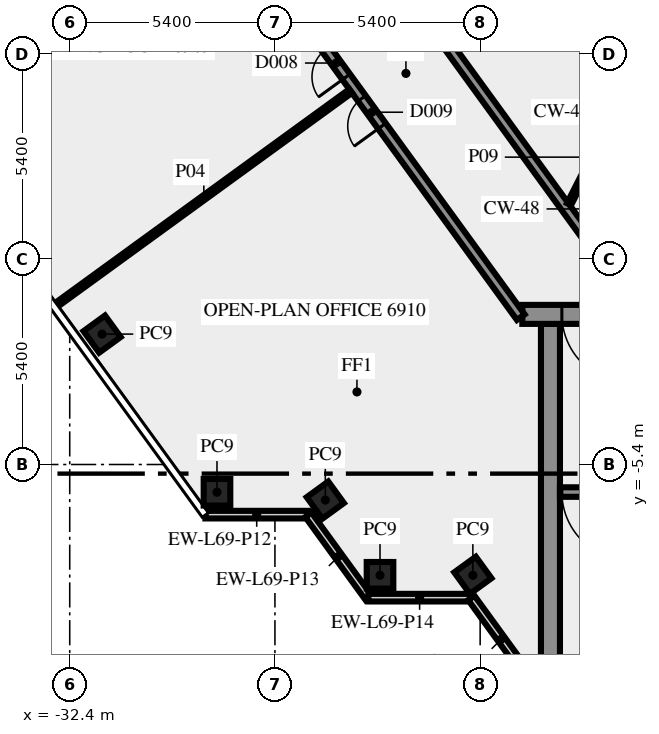
"""IFC4 building model, lengths in metres.
Left out: names, types, materials, properties, quantities, classifications, styles, units other than length and angle.
Written with IfcOpenShell. Run it as: python <this file> out.ifc"""

import sys

from ifc_helpers import new_model, si_unit, direction, frame, frame_2d, origin, origin_2d, place, context, subcontext, project, spatial, rectangle, extrude, element, fill, save


model = new_model("IFC4")
c1 = context("Model", 3, precision=1e-05, world=origin(), true_north=direction((0.0, 1.0)))
c2 = subcontext(c1, "Body", "Model", "MODEL_VIEW")
j1 = project(units=[si_unit("LENGTHUNIT", "METRE"), si_unit("PLANEANGLEUNIT", "RADIAN")], contexts=[c1])
p1 = place(None, origin())
s1 = spatial("IfcSite", under=j1, at=p1, CompositionType="ELEMENT")
p2 = place(p1, origin())
s2 = spatial("IfcBuilding", under=s1, at=p2, CompositionType="ELEMENT")
p3 = place(p2, frame((0.0, 0.0, 297.0)))
s3 = spatial("IfcBuildingStorey", under=s2, at=p3, CompositionType="ELEMENT", Elevation=297.0)
for number, where, z_axis, x_axis in (
    (1, (-31.548, -1.969, 0.0), (0.0, 0.0, 1.0), (0.588, -0.809, 0.0)),
    (2, (-28.525, -6.13, 0.0), (0.0, 0.0, 1.0), (1.0, 0.0, 0.0)),
    (3, (-25.674, -6.337, 0.0), (0.0, 0.0, 1.0), (0.588, -0.809, 0.0)),
    (4, (-24.235, -8.315, 0.0), (0.0, 0.0, 1.0), (1.0, 0.0, 0.0)),
    (5, (-21.792, -8.315, 0.0), (0.0, 0.0, 1.0), (0.588, -0.809, 0.0)),
):
    element("IfcColumn", number, at=place(p3, frame(where, z_axis=z_axis, x_axis=x_axis)), inside=s3, PredefinedType="COLUMN", context=c2, shape_type="SweptSolid", body=[
        extrude(rectangle(XDim=0.7, YDim=0.7, at=origin_2d()), origin(), (0.0, 0.0, 1.0), 3.4),
    ])
p4 = place(p3, frame((-28.83, -6.719, 0.0), z_axis=(0.0, 0.0, 1.0), x_axis=(1.0, 0.0, 0.0)))
e6 = element("IfcWall", 6, at=p4, inside=s3, PredefinedType="SOLIDWALL", context=c2, shape_type="SweptSolid", body=[
    extrude(rectangle(XDim=2.7, YDim=0.2, at=frame_2d((1.35, 0.0))), origin(), (0.0, 0.0, 1.0), 3.4),
])
p5 = place(p3, frame((-26.12, -6.724, 0.0), z_axis=(0.0, 0.0, 1.0), x_axis=(0.587720002413, -0.809064397168, 0.0)))
e7 = element("IfcWall", 7, at=p5, inside=s3, PredefinedType="SOLIDWALL", context=c2, shape_type="SweptSolid", body=[
    extrude(rectangle(XDim=2.7, YDim=0.2, at=frame_2d((1.35, 0.0))), origin(), (0.0, 0.0, 1.0), 3.4),
])
p6 = place(p3, frame((-24.543, -8.904, 0.0), z_axis=(0.0, 0.0, 1.0), x_axis=(1.0, 0.0, 0.0)))
e8 = element("IfcWall", 8, at=p6, inside=s3, PredefinedType="SOLIDWALL", context=c2, shape_type="SweptSolid", body=[
    extrude(rectangle(XDim=2.7, YDim=0.2, at=frame_2d((1.35, 0.0))), origin(), (0.0, 0.0, 1.0), 3.4),
])
p7 = place(p3, frame((-21.833, -8.909, 0.0), z_axis=(0.0, 0.0, 1.0), x_axis=(0.587766567315, -0.809030569476, 0.0)))
e9 = element("IfcWall", 9, at=p7, inside=s3, PredefinedType="SOLIDWALL", context=c2, shape_type="SweptSolid", body=[
    extrude(rectangle(XDim=2.688, YDim=0.2, at=frame_2d((1.344, 0.0))), origin(), (0.0, 0.0, 1.0), 3.4),
])
p8 = place(p3, frame((-19.75, -10.5, 0.0), z_axis=(0.0, 0.0, 1.0), x_axis=(0.0, 1.0, 0.0)))
e10 = element("IfcWall", 10, at=p8, inside=s3, PredefinedType="SHEAR", context=c2, shape_type="SweptSolid", body=[
    extrude(rectangle(XDim=8.8, YDim=0.5, at=frame_2d((4.4, 0.0))), origin(), (0.0, 0.0, 1.0), 3.4),
])
p9 = place(p3, frame((-11.45, -6.125, 0.0), z_axis=(0.0, 0.0, 1.0), x_axis=(-1.0, 0.0, 0.0)))
e11 = element("IfcWall", 11, at=p9, inside=s3, PredefinedType="SHEAR", context=c2, shape_type="SweptSolid", body=[
    extrude(rectangle(XDim=8.05, YDim=0.25, at=frame_2d((4.025, 0.0))), origin(), (0.0, 0.0, 1.0), 3.4),
])
p10 = place(p9, frame((6.2, 0.0, 0.0)))
e12 = element("IfcOpeningElement", 12, at=p10, cuts=e11, PredefinedType="OPENING", context=c2, shape_type="SweptSolid", body=[
    extrude(rectangle(XDim=1.8, YDim=2.1, at=frame_2d((0.9, 1.05))), frame((0.0, 0.135, 0.0), z_axis=(0.0, -1.0, 0.0), x_axis=(1.0, 0.0, 0.0)), (0.0, 0.0, 1.0), 0.27),
])
p11 = place(p3, frame((20.49, -1.45, 0.0), z_axis=(0.0, 0.0, 1.0), x_axis=(-1.0, 0.0, 0.0)))
e13 = element("IfcWall", 13, at=p11, inside=s3, PredefinedType="SHEAR", context=c2, shape_type="SweptSolid", body=[
    extrude(rectangle(XDim=40.98, YDim=0.5, at=frame_2d((20.49, 0.0))), origin(), (0.0, 0.0, 1.0), 3.4),
])
p12 = place(p11, frame((38.14, 0.0, 0.0)))
e14 = element("IfcOpeningElement", 14, at=p12, cuts=e13, PredefinedType="OPENING", context=c2, shape_type="SweptSolid", body=[
    extrude(rectangle(XDim=1.8, YDim=2.1, at=frame_2d((0.9, 1.05))), frame((0.0, 0.26, 0.0), z_axis=(0.0, -1.0, 0.0), x_axis=(1.0, 0.0, 0.0)), (0.0, 0.0, 1.0), 0.52),
])
p13 = place(p11, frame((36.728, 0.0, 0.0)))
e15 = element("IfcOpeningElement", 15, at=p13, cuts=e13, PredefinedType="OPENING", context=c2, shape_type="SweptSolid", body=[
    extrude(rectangle(XDim=0.8, YDim=2.1, at=frame_2d((0.4, 1.05))), frame((0.0, 0.26, 0.0), z_axis=(0.0, -1.0, 0.0), x_axis=(1.0, 0.0, 0.0)), (0.0, 0.0, 1.0), 0.52),
])
p14 = place(p11, frame((35.153, 0.0, 0.0)))
e16 = element("IfcOpeningElement", 16, at=p14, cuts=e13, PredefinedType="OPENING", context=c2, shape_type="SweptSolid", body=[
    extrude(rectangle(XDim=0.8, YDim=2.1, at=frame_2d((0.4, 1.05))), frame((0.0, 0.26, 0.0), z_axis=(0.0, -1.0, 0.0), x_axis=(1.0, 0.0, 0.0)), (0.0, 0.0, 1.0), 0.52),
])
p15 = place(p11, frame((32.94, 0.0, 0.0)))
e17 = element("IfcOpeningElement", 17, at=p15, cuts=e13, PredefinedType="OPENING", context=c2, shape_type="SweptSolid", body=[
    extrude(rectangle(XDim=0.9, YDim=2.1, at=frame_2d((0.45, 1.05))), frame((0.0, 0.26, 0.0), z_axis=(0.0, -1.0, 0.0), x_axis=(1.0, 0.0, 0.0)), (0.0, 0.0, 1.0), 0.52),
])
p16 = place(p11, frame((31.015, 0.0, 0.0)))
e18 = element("IfcOpeningElement", 18, at=p16, cuts=e13, PredefinedType="OPENING", context=c2, shape_type="SweptSolid", body=[
    extrude(rectangle(XDim=0.8, YDim=2.1, at=frame_2d((0.4, 1.05))), frame((0.0, 0.26, 0.0), z_axis=(0.0, -1.0, 0.0), x_axis=(1.0, 0.0, 0.0)), (0.0, 0.0, 1.0), 0.52),
])
p17 = place(p11, frame((24.765, 0.0, 0.0)))
e19 = element("IfcOpeningElement", 19, at=p17, cuts=e13, PredefinedType="OPENING", context=c2, shape_type="SweptSolid", body=[
    extrude(rectangle(XDim=0.8, YDim=2.1, at=frame_2d((0.4, 1.05))), frame((0.0, 0.26, 0.0), z_axis=(0.0, -1.0, 0.0), x_axis=(1.0, 0.0, 0.0)), (0.0, 0.0, 1.0), 0.52),
])
p18 = place(p11, frame((19.59, 0.0, 0.0)))
e20 = element("IfcOpeningElement", 20, at=p18, cuts=e13, PredefinedType="OPENING", context=c2, shape_type="SweptSolid", body=[
    extrude(rectangle(XDim=2.0, YDim=2.1, at=frame_2d((1.0, 1.05))), frame((0.0, 0.26, 0.0), z_axis=(0.0, -1.0, 0.0), x_axis=(1.0, 0.0, 0.0)), (0.0, 0.0, 1.0), 0.52),
])
p19 = place(p11, frame((14.202, 0.0, 0.0)))
e21 = element("IfcOpeningElement", 21, at=p19, cuts=e13, PredefinedType="OPENING", context=c2, shape_type="SweptSolid", body=[
    extrude(rectangle(XDim=0.9, YDim=2.1, at=frame_2d((0.45, 1.05))), frame((0.0, 0.26, 0.0), z_axis=(0.0, -1.0, 0.0), x_axis=(1.0, 0.0, 0.0)), (0.0, 0.0, 1.0), 0.52),
])
p20 = place(p11, frame((10.478, 0.0, 0.0)))
e22 = element("IfcOpeningElement", 22, at=p20, cuts=e13, PredefinedType="OPENING", context=c2, shape_type="SweptSolid", body=[
    extrude(rectangle(XDim=0.9, YDim=2.1, at=frame_2d((0.45, 1.05))), frame((0.0, 0.26, 0.0), z_axis=(0.0, -1.0, 0.0), x_axis=(1.0, 0.0, 0.0)), (0.0, 0.0, 1.0), 0.52),
])
p21 = place(p11, frame((7.14, 0.0, 0.0)))
e23 = element("IfcOpeningElement", 23, at=p21, cuts=e13, PredefinedType="OPENING", context=c2, shape_type="SweptSolid", body=[
    extrude(rectangle(XDim=0.9, YDim=2.1, at=frame_2d((0.45, 1.05))), frame((0.0, 0.26, 0.0), z_axis=(0.0, -1.0, 0.0), x_axis=(1.0, 0.0, 0.0)), (0.0, 0.0, 1.0), 0.52),
])
p22 = place(p11, frame((4.19, 0.0, 0.0)))
e24 = element("IfcOpeningElement", 24, at=p22, cuts=e13, PredefinedType="OPENING", context=c2, shape_type="SweptSolid", body=[
    extrude(rectangle(XDim=0.9, YDim=2.1, at=frame_2d((0.45, 1.05))), frame((0.0, 0.26, 0.0), z_axis=(0.0, -1.0, 0.0), x_axis=(1.0, 0.0, 0.0)), (0.0, 0.0, 1.0), 0.52),
])
p23 = place(p11, frame((1.04, 0.0, 0.0)))
e25 = element("IfcOpeningElement", 25, at=p23, cuts=e13, PredefinedType="OPENING", context=c2, shape_type="SweptSolid", body=[
    extrude(rectangle(XDim=1.8, YDim=2.1, at=frame_2d((0.9, 1.05))), frame((0.0, 0.26, 0.0), z_axis=(0.0, -1.0, 0.0), x_axis=(1.0, 0.0, 0.0)), (0.0, 0.0, 1.0), 0.52),
])
p24 = place(p3, frame((-20.531, -1.523, 0.0), z_axis=(0.0, 0.0, 1.0), x_axis=(-0.587785867777, 0.809016547199, 0.0)))
e26 = element("IfcWall", 26, at=p24, inside=s3, PredefinedType="SOLIDWALL", context=c2, shape_type="SweptSolid", body=[
    extrude(rectangle(XDim=16.67, YDim=0.25, at=frame_2d((8.335, 0.0))), origin(), (0.0, 0.0, 1.0), 3.4),
])
p25 = place(p24, frame((6.216, 0.0, 0.0)))
e27 = element("IfcOpeningElement", 27, at=p25, cuts=e26, PredefinedType="OPENING", context=c2, shape_type="SweptSolid", body=[
    extrude(rectangle(XDim=0.9, YDim=2.1, at=frame_2d((0.45, 1.05))), frame((0.0, 0.135, 0.0), z_axis=(0.0, -1.0, 0.0), x_axis=(1.0, 0.0, 0.0)), (0.0, 0.0, 1.0), 0.27),
])
p26 = place(p24, frame((7.816, 0.0, 0.0)))
e28 = element("IfcOpeningElement", 28, at=p26, cuts=e26, PredefinedType="OPENING", context=c2, shape_type="SweptSolid", body=[
    extrude(rectangle(XDim=0.9, YDim=2.1, at=frame_2d((0.45, 1.05))), frame((0.0, 0.135, 0.0), z_axis=(0.0, -1.0, 0.0), x_axis=(1.0, 0.0, 0.0)), (0.0, 0.0, 1.0), 0.27),
])
p27 = place(p3, frame((-28.039, 13.319, 0.0), z_axis=(0.0, 0.0, 1.0), x_axis=(0.587791911753, -0.809012155952, 0.0)))
e29 = element("IfcWall", 29, at=p27, inside=s3, PredefinedType="SOLIDWALL", context=c2, shape_type="SweptSolid", body=[
    extrude(rectangle(XDim=17.853, YDim=0.25, at=frame_2d((8.927, 0.0))), origin(), (0.0, 0.0, 1.0), 3.4),
])
p28 = place(p27, frame((0.225, 0.0, 0.0)))
e30 = element("IfcOpeningElement", 30, at=p28, cuts=e29, PredefinedType="OPENING", context=c2, shape_type="SweptSolid", body=[
    extrude(rectangle(XDim=0.9, YDim=2.1, at=frame_2d((0.45, 1.05))), frame((0.0, 0.135, 0.0), z_axis=(0.0, -1.0, 0.0), x_axis=(1.0, 0.0, 0.0)), (0.0, 0.0, 1.0), 0.27),
])
p29 = place(p3, frame((-25.008, 4.427, 0.0), z_axis=(0.0, 0.0, 1.0), x_axis=(-0.808994684961, -0.587815957341, 0.0)))
e31 = element("IfcWall", 31, at=p29, inside=s3, PredefinedType="PARTITIONING", context=c2, shape_type="SweptSolid", body=[
    extrude(rectangle(XDim=9.55, YDim=0.12, at=frame_2d((4.775, 0.0))), origin(), (0.0, 0.0, 1.0), 2.7),
])
p30 = place(p3, frame((-19.261, 1.45, 0.0), z_axis=(0.0, 0.0, 1.0), x_axis=(0.453950796792, 0.891026752736, 0.0)))
e32 = element("IfcWall", 32, at=p30, inside=s3, PredefinedType="PARTITIONING", context=c2, shape_type="SweptSolid", body=[
    extrude(rectangle(XDim=2.778, YDim=0.12, at=frame_2d((1.389, 0.0))), origin(), (0.0, 0.0, 1.0), 3.4),
])
p31 = place(p10, origin())
e33 = element("IfcDoor", 33, at=p31, inside=s3, OperationType="DOUBLE_DOOR_SINGLE_SWING", PredefinedType="DOOR", context=c2, shape_type="SweptSolid", body=[
    extrude(rectangle(XDim=1.8, YDim=2.1, at=frame_2d((0.9, 1.05))), frame((0.0, 0.025, 0.0), z_axis=(0.0, -1.0, 0.0), x_axis=(1.0, 0.0, 0.0)), (0.0, 0.0, 1.0), 0.05),
])
fill(e12, e33)
p32 = place(p12, origin())
e34 = element("IfcDoor", 34, at=p32, inside=s3, OperationType="DOUBLE_DOOR_SINGLE_SWING", PredefinedType="DOOR", context=c2, shape_type="SweptSolid", body=[
    extrude(rectangle(XDim=1.8, YDim=2.1, at=frame_2d((0.9, 1.05))), frame((0.0, 0.025, 0.0), z_axis=(0.0, -1.0, 0.0), x_axis=(1.0, 0.0, 0.0)), (0.0, 0.0, 1.0), 0.05),
])
fill(e14, e34)
p33 = place(p25, origin())
e35 = element("IfcDoor", 35, at=p33, inside=s3, OperationType="SINGLE_SWING_RIGHT", PredefinedType="DOOR", context=c2, shape_type="SweptSolid", body=[
    extrude(rectangle(XDim=0.9, YDim=2.1, at=frame_2d((0.45, 1.05))), frame((0.0, 0.025, 0.0), z_axis=(0.0, -1.0, 0.0), x_axis=(1.0, 0.0, 0.0)), (0.0, 0.0, 1.0), 0.05),
])
fill(e27, e35)
p34 = place(p26, origin())
e36 = element("IfcDoor", 36, at=p34, inside=s3, OperationType="SINGLE_SWING_LEFT", PredefinedType="DOOR", context=c2, shape_type="SweptSolid", body=[
    extrude(rectangle(XDim=0.9, YDim=2.1, at=frame_2d((0.45, 1.05))), frame((0.0, 0.025, 0.0), z_axis=(0.0, -1.0, 0.0), x_axis=(1.0, 0.0, 0.0)), (0.0, 0.0, 1.0), 0.05),
])
fill(e28, e36)
save(model, sys.argv[1])
